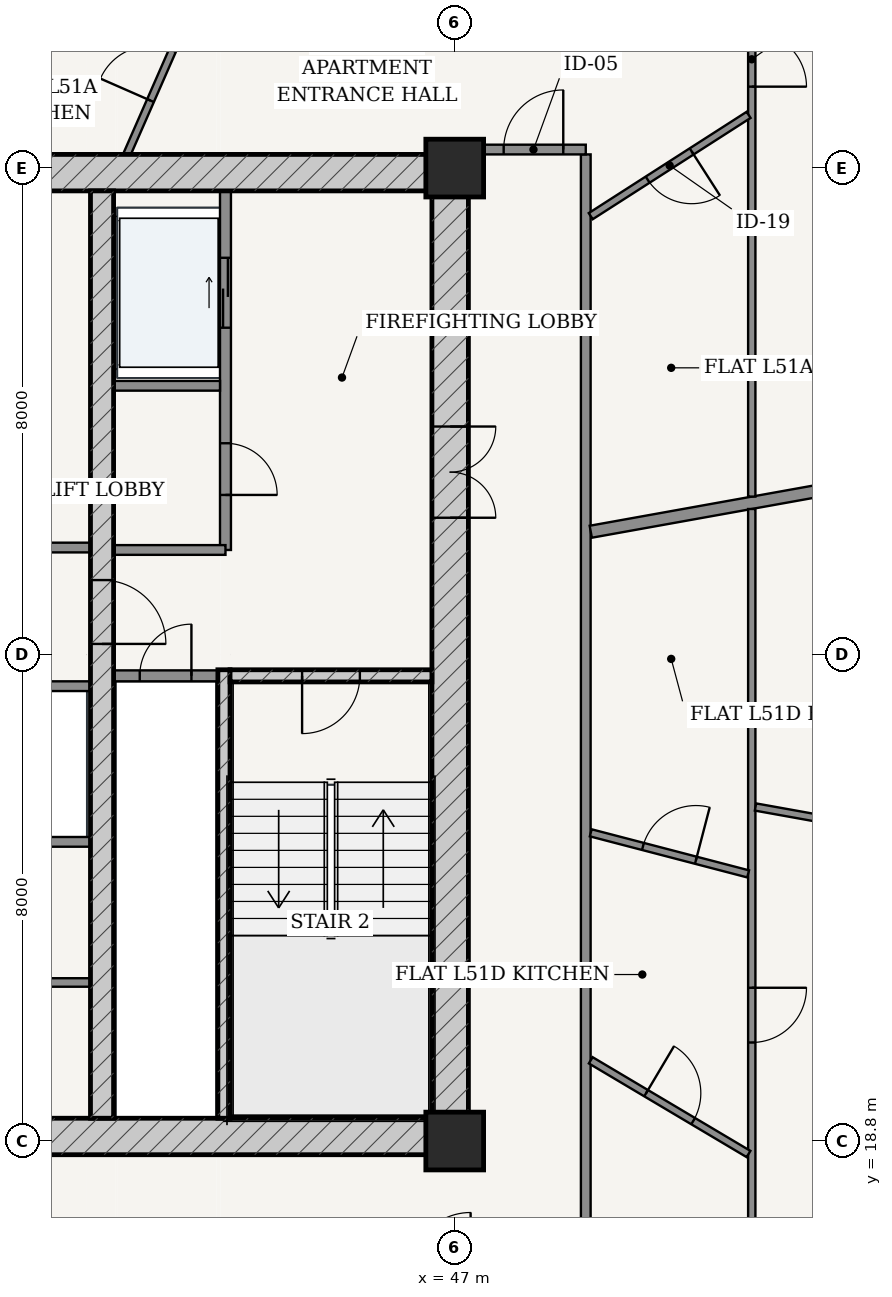
"""IFC4 building model, lengths in metres.
Left out: names, types, materials, properties, quantities, classifications, styles, units other than length and angle.
Written with IfcOpenShell. Run it as: python <this file> out.ifc"""

import sys

from ifc_helpers import new_model, si_unit, direction, frame, frame_2d, origin, origin_2d, place, context, subcontext, project, spatial, rectangle, extrude, source, transform, mapped, element, fill, save


model = new_model("IFC4")
c1 = context("Model", 3, precision=1e-05, world=origin(), true_north=direction((-0.2419218956, 0.970295726276)))
c2 = subcontext(c1, "Body", "Model", "MODEL_VIEW")
j1 = project(units=[si_unit("LENGTHUNIT", "METRE"), si_unit("PLANEANGLEUNIT", "RADIAN")], contexts=[c1])
p1 = place(None, origin())
s1 = spatial("IfcSite", under=j1, at=p1, CompositionType="ELEMENT")
p2 = place(p1, origin())
s2 = spatial("IfcBuilding", under=s1, at=p2, CompositionType="ELEMENT")
p3 = place(p2, frame((0.0, 0.0, 194.9)))
s3 = spatial("IfcBuildingStorey", under=s2, at=p3, CompositionType="ELEMENT", Elevation=194.9)
for number, where, z_axis, x_axis in (
    (1, (47.0, 18.8, 0.0), (0.0, 0.0, 1.0), (1.0, 0.0, 0.0)),
    (2, (47.0, 34.8, 0.0), (0.0, 0.0, 1.0), (1.0, 0.0, 0.0)),
):
    element("IfcColumn", number, at=place(p3, frame(where, z_axis=z_axis, x_axis=x_axis)), inside=s3, PredefinedType="COLUMN", context=c2, shape_type="SweptSolid", body=[
        extrude(rectangle(XDim=0.95, YDim=0.95, at=origin_2d()), origin(), (0.0, 0.0, 1.0), 3.7),
    ])
p4 = place(p3, frame((28.775, 18.875, 0.0), z_axis=(0.0, 0.0, 1.0), x_axis=(1.0, 0.0, 0.0)))
e3 = element("IfcWall", 3, at=p4, inside=s3, PredefinedType="SHEAR", context=c2, shape_type="SweptSolid", body=[
    extrude(rectangle(XDim=18.45, YDim=0.6, at=frame_2d((9.225, 0.0))), origin(), (0.0, 0.0, 1.0), 3.435),
])
p5 = place(p4, frame((8.8, 0.0, 0.0)))
e4 = element("IfcOpeningElement", 4, at=p5, cuts=e3, PredefinedType="OPENING", context=c2, shape_type="SweptSolid", body=[
    extrude(rectangle(XDim=0.85, YDim=2.1, at=frame_2d((0.425, 1.05))), frame((0.0, 0.31, 0.0), z_axis=(0.0, -1.0, 0.0), x_axis=(1.0, 0.0, 0.0)), (0.0, 0.0, 1.0), 0.62),
])
p6 = place(p3, frame((28.775, 34.725, 0.0), z_axis=(0.0, 0.0, 1.0), x_axis=(1.0, 0.0, 0.0)))
e5 = element("IfcWall", 5, at=p6, inside=s3, PredefinedType="SHEAR", context=c2, shape_type="SweptSolid", body=[
    extrude(rectangle(XDim=18.45, YDim=0.6, at=frame_2d((9.225, 0.0))), origin(), (0.0, 0.0, 1.0), 3.435),
])
p7 = place(p3, frame((46.925, 19.175, 0.0), z_axis=(0.0, 0.0, 1.0), x_axis=(0.0, 1.0, 0.0)))
e6 = element("IfcWall", 6, at=p7, inside=s3, PredefinedType="SHEAR", context=c2, shape_type="SweptSolid", body=[
    extrude(rectangle(XDim=15.25, YDim=0.6, at=frame_2d((7.625, 0.0))), origin(), (0.0, 0.0, 1.0), 3.435),
])
p8 = place(p7, frame((9.875, 0.0, 0.0)))
e7 = element("IfcOpeningElement", 7, at=p8, cuts=e6, PredefinedType="OPENING", context=c2, shape_type="SweptSolid", body=[
    extrude(rectangle(XDim=1.5, YDim=2.2, at=frame_2d((0.75, 1.1))), frame((0.0, 0.31, 0.0), z_axis=(0.0, -1.0, 0.0), x_axis=(1.0, 0.0, 0.0)), (0.0, 0.0, 1.0), 0.62),
])
p9 = place(p3, frame((43.205, 19.175, 0.0), z_axis=(0.0, 0.0, 1.0), x_axis=(0.0, 1.0, 0.0)))
e8 = element("IfcWall", 8, at=p9, inside=s3, PredefinedType="SOLIDWALL", context=c2, shape_type="SweptSolid", body=[
    extrude(rectangle(XDim=7.375, YDim=0.2, at=frame_2d((3.688, 0.0))), origin(), (0.0, 0.0, 1.0), 3.435),
])
p10 = place(p3, frame((43.305, 26.45, 0.0), z_axis=(0.0, 0.0, 1.0), x_axis=(1.0, 0.0, 0.0)))
e9 = element("IfcWall", 9, at=p10, inside=s3, PredefinedType="SOLIDWALL", context=c2, shape_type="SweptSolid", body=[
    extrude(rectangle(XDim=3.32, YDim=0.2, at=frame_2d((1.66, 0.0))), origin(), (0.0, 0.0, 1.0), 3.435),
])
p11 = place(p10, frame((1.185, 0.0, 0.0)))
e10 = element("IfcOpeningElement", 10, at=p11, cuts=e9, PredefinedType="OPENING", context=c2, shape_type="SweptSolid", body=[
    extrude(rectangle(XDim=0.95, YDim=2.15, at=frame_2d((0.475, 1.075))), frame((0.0, 0.11, 0.0), z_axis=(0.0, -1.0, 0.0), x_axis=(1.0, 0.0, 0.0)), (0.0, 0.0, 1.0), 0.22),
])
p12 = place(p3, frame((41.2, 19.175, 0.0), z_axis=(0.0, 0.0, 1.0), x_axis=(0.0, 1.0, 0.0)))
e11 = element("IfcWall", 11, at=p12, inside=s3, PredefinedType="SHEAR", context=c2, shape_type="SweptSolid", body=[
    extrude(rectangle(XDim=15.25, YDim=0.38, at=frame_2d((7.625, 0.0))), origin(), (0.0, 0.0, 1.0), 3.435),
])
p13 = place(p12, frame((7.8, 0.0, 0.0)))
e12 = element("IfcOpeningElement", 12, at=p13, cuts=e11, PredefinedType="OPENING", context=c2, shape_type="SweptSolid", body=[
    extrude(rectangle(XDim=1.05, YDim=2.15, at=frame_2d((0.525, 1.075))), frame((0.0, 0.2, 0.0), z_axis=(0.0, -1.0, 0.0), x_axis=(1.0, 0.0, 0.0)), (0.0, 0.0, 1.0), 0.4),
])
p14 = place(p3, frame((41.39, 26.45, 0.0), z_axis=(0.0, 0.0, 1.0), x_axis=(1.0, 0.0, 0.0)))
e13 = element("IfcWall", 13, at=p14, inside=s3, PredefinedType="PARTITIONING", context=c2, shape_type="SweptSolid", body=[
    extrude(rectangle(XDim=1.71, YDim=0.18, at=frame_2d((0.855, 0.0))), origin(), (0.0, 0.0, 1.0), 3.435),
])
p15 = place(p14, frame((0.43, 0.0, 0.0)))
e14 = element("IfcOpeningElement", 14, at=p15, cuts=e13, PredefinedType="OPENING", context=c2, shape_type="SweptSolid", body=[
    extrude(rectangle(XDim=0.85, YDim=2.1, at=frame_2d((0.425, 1.05))), frame((0.0, 0.1, 0.0), z_axis=(0.0, -1.0, 0.0), x_axis=(1.0, 0.0, 0.0)), (0.0, 0.0, 1.0), 0.2),
])
p16 = place(p3, frame((43.23, 28.52, 0.0), z_axis=(0.0, 0.0, 1.0), x_axis=(0.0, 1.0, 0.0)))
e15 = element("IfcWall", 15, at=p16, inside=s3, PredefinedType="PARTITIONING", context=c2, shape_type="SweptSolid", body=[
    extrude(rectangle(XDim=5.905, YDim=0.18, at=frame_2d((2.953, 0.0))), origin(), (0.0, 0.0, 1.0), 3.435),
])
p17 = place(p16, frame((0.905, 0.0, 0.0)))
e16 = element("IfcOpeningElement", 16, at=p17, cuts=e15, PredefinedType="OPENING", context=c2, shape_type="SweptSolid", body=[
    extrude(rectangle(XDim=0.85, YDim=2.1, at=frame_2d((0.425, 1.05))), frame((0.0, 0.1, 0.0), z_axis=(0.0, -1.0, 0.0), x_axis=(1.0, 0.0, 0.0)), (0.0, 0.0, 1.0), 0.2),
])
p18 = place(p16, frame((3.655, 0.0, 0.0)))
e17 = element("IfcOpeningElement", 17, at=p18, cuts=e15, PredefinedType="OPENING", context=c2, shape_type="SweptSolid", body=[
    extrude(rectangle(XDim=1.15, YDim=2.2, at=frame_2d((0.575, 1.1))), frame((0.0, 0.1, 0.0), z_axis=(0.0, -1.0, 0.0), x_axis=(1.0, 0.0, 0.0)), (0.0, 0.0, 1.0), 0.2),
])
p19 = place(p3, frame((41.39, 31.22, 0.0), z_axis=(0.0, 0.0, 1.0), x_axis=(1.0, 0.0, 0.0)))
e18 = element("IfcWall", 18, at=p19, inside=s3, PredefinedType="PARTITIONING", context=c2, shape_type="SweptSolid", body=[
    extrude(rectangle(XDim=1.75, YDim=0.16, at=frame_2d((0.875, 0.0))), origin(), (0.0, 0.0, 1.0), 3.435),
])
p20 = place(p3, frame((41.39, 28.52, 0.0), z_axis=(0.0, 0.0, 1.0), x_axis=(1.0, 0.0, 0.0)))
e19 = element("IfcWall", 19, at=p20, inside=s3, PredefinedType="PARTITIONING", context=c2, shape_type="SweptSolid", body=[
    extrude(rectangle(XDim=1.84, YDim=0.16, at=frame_2d((0.92, 0.0))), origin(), (0.0, 0.0, 1.0), 3.435),
])
p21 = place(p3, frame((34.99, 28.56, 0.0), z_axis=(0.0, 0.0, 1.0), x_axis=(1.0, 0.0, 0.0)))
e20 = element("IfcWall", 20, at=p21, inside=s3, PredefinedType="PARTITIONING", context=c2, shape_type="SweptSolid", body=[
    extrude(rectangle(XDim=6.02, YDim=0.16, at=frame_2d((3.01, 0.0))), origin(), (0.0, 0.0, 1.0), 3.435),
])
p22 = place(p21, frame((2.585, 0.0, 0.0)))
e21 = element("IfcOpeningElement", 21, at=p22, cuts=e20, PredefinedType="OPENING", context=c2, shape_type="SweptSolid", body=[
    extrude(rectangle(XDim=0.85, YDim=2.1, at=frame_2d((0.425, 1.05))), frame((0.0, 0.09, 0.0), z_axis=(0.0, -1.0, 0.0), x_axis=(1.0, 0.0, 0.0)), (0.0, 0.0, 1.0), 0.18),
])
p23 = place(p3, frame((34.99, 26.28, 0.0), z_axis=(0.0, 0.0, 1.0), x_axis=(1.0, 0.0, 0.0)))
e22 = element("IfcWall", 22, at=p23, inside=s3, PredefinedType="PARTITIONING", context=c2, shape_type="SweptSolid", body=[
    extrude(rectangle(XDim=6.02, YDim=0.16, at=frame_2d((3.01, 0.0))), origin(), (0.0, 0.0, 1.0), 3.435),
])
p24 = place(p23, frame((0.225, 0.0, 0.0)))
e23 = element("IfcOpeningElement", 23, at=p24, cuts=e22, PredefinedType="OPENING", context=c2, shape_type="SweptSolid", body=[
    extrude(rectangle(XDim=1.1, YDim=2.2, at=frame_2d((0.55, 1.1))), frame((0.0, 0.09, 0.0), z_axis=(0.0, -1.0, 0.0), x_axis=(1.0, 0.0, 0.0)), (0.0, 0.0, 1.0), 0.18),
])
p25 = place(p23, frame((1.705, 0.0, 0.0)))
e24 = element("IfcOpeningElement", 24, at=p25, cuts=e22, PredefinedType="OPENING", context=c2, shape_type="SweptSolid", body=[
    extrude(rectangle(XDim=1.1, YDim=2.2, at=frame_2d((0.55, 1.1))), frame((0.0, 0.09, 0.0), z_axis=(0.0, -1.0, 0.0), x_axis=(1.0, 0.0, 0.0)), (0.0, 0.0, 1.0), 0.18),
])
p26 = place(p3, frame((34.99, 23.72, 0.0), z_axis=(0.0, 0.0, 1.0), x_axis=(1.0, 0.0, 0.0)))
e25 = element("IfcWall", 25, at=p26, inside=s3, PredefinedType="PARTITIONING", context=c2, shape_type="SweptSolid", body=[
    extrude(rectangle(XDim=6.02, YDim=0.16, at=frame_2d((3.01, 0.0))), origin(), (0.0, 0.0, 1.0), 3.435),
])
p27 = place(p3, frame((34.99, 21.407, 0.0), z_axis=(0.0, 0.0, 1.0), x_axis=(1.0, 0.0, 0.0)))
e26 = element("IfcWall", 26, at=p27, inside=s3, PredefinedType="PARTITIONING", context=c2, shape_type="SweptSolid", body=[
    extrude(rectangle(XDim=6.02, YDim=0.14, at=frame_2d((3.01, 0.0))), origin(), (0.0, 0.0, 1.0), 3.435),
])
p28 = place(p27, frame((2.585, 0.0, 0.0)))
e27 = element("IfcOpeningElement", 27, at=p28, cuts=e26, PredefinedType="OPENING", context=c2, shape_type="SweptSolid", body=[
    extrude(rectangle(XDim=0.85, YDim=2.1, at=frame_2d((0.425, 1.05))), frame((0.0, 0.08, 0.0), z_axis=(0.0, -1.0, 0.0), x_axis=(1.0, 0.0, 0.0)), (0.0, 0.0, 1.0), 0.16),
])
p29 = place(p3, frame((49.155, 16.725, 0.0), z_axis=(0.0, 0.0, 1.0), x_axis=(0.0, 1.0, 0.0)))
e28 = element("IfcWall", 28, at=p29, inside=s3, PredefinedType="PARTITIONING", context=c2, shape_type="SweptSolid", body=[
    extrude(rectangle(XDim=18.3, YDim=0.16, at=frame_2d((9.15, 0.0))), origin(), (0.0, 0.0, 1.0), 2.951),
])
p30 = place(p3, frame((47.225, 35.105, 0.0), z_axis=(0.0, 0.0, 1.0), x_axis=(1.0, 0.0, 0.0)))
e29 = element("IfcWall", 29, at=p30, inside=s3, PredefinedType="PARTITIONING", context=c2, shape_type="SweptSolid", body=[
    extrude(rectangle(XDim=1.93, YDim=0.16, at=frame_2d((0.965, 0.0))), origin(), (0.0, 0.0, 1.0), 3.435),
])
p31 = place(p30, frame((0.58, 0.0, 0.0)))
e30 = element("IfcOpeningElement", 30, at=p31, cuts=e29, PredefinedType="OPENING", context=c2, shape_type="SweptSolid", body=[
    extrude(rectangle(XDim=0.98, YDim=2.2, at=frame_2d((0.49, 1.1))), frame((0.0, 0.09, 0.0), z_axis=(0.0, -1.0, 0.0), x_axis=(1.0, 0.0, 0.0)), (0.0, 0.0, 1.0), 0.18),
])
p32 = place(p3, frame((49.237, 28.82, 0.0), z_axis=(0.0, 0.0, 1.0), x_axis=(0.984224859606, 0.176922089446, 0.0)))
e31 = element("IfcWall", 31, at=p32, inside=s3, PredefinedType="PARTITIONING", context=c2, shape_type="SweptSolid", body=[
    extrude(rectangle(XDim=10.2, YDim=0.2, at=frame_2d((5.1, 0.0))), origin(), (0.0, 0.0, 1.0), 2.951),
])
p33 = place(p3, frame((51.885, 37.835, 0.0), z_axis=(0.0, 0.0, 1.0), x_axis=(0.0, -1.0, 0.0)))
e32 = element("IfcWall", 32, at=p33, inside=s3, PredefinedType="PARTITIONING", context=c2, shape_type="SweptSolid", body=[
    extrude(rectangle(XDim=8.437, YDim=0.12, at=frame_2d((4.219, 0.0))), origin(), (0.0, 0.0, 1.0), 2.951),
])
p34 = place(p33, frame((0.796, 0.0, 0.0)))
e33 = element("IfcOpeningElement", 33, at=p34, cuts=e32, PredefinedType="OPENING", context=c2, shape_type="SweptSolid", body=[
    extrude(rectangle(XDim=0.9, YDim=2.15, at=frame_2d((0.45, 1.075))), frame((0.0, 0.07, 0.0), z_axis=(0.0, -1.0, 0.0), x_axis=(1.0, 0.0, 0.0)), (0.0, 0.0, 1.0), 0.14),
])
p35 = place(p3, frame((49.237, 34.009, 0.0), z_axis=(0.0, 0.0, 1.0), x_axis=(0.841651322174, 0.540021343915, 0.0)))
e34 = element("IfcWall", 34, at=p35, inside=s3, PredefinedType="PARTITIONING", context=c2, shape_type="SweptSolid", body=[
    extrude(rectangle(XDim=3.085, YDim=0.12, at=frame_2d((1.542, 0.0))), origin(), (0.0, 0.0, 1.0), 3.11),
])
p36 = place(p35, frame((1.112, 0.0, 0.0)))
e35 = element("IfcOpeningElement", 35, at=p36, cuts=e34, PredefinedType="OPENING", context=c2, shape_type="SweptSolid", body=[
    extrude(rectangle(XDim=0.86, YDim=2.15, at=frame_2d((0.43, 1.075))), frame((0.0, 0.07, 0.0), z_axis=(0.0, -1.0, 0.0), x_axis=(1.0, 0.0, 0.0)), (0.0, 0.0, 1.0), 0.14),
])
p37 = place(p3, frame((41.61, 35.027, 0.0), z_axis=(0.0, 0.0, 1.0), x_axis=(0.401859508224, 0.915701335398, 0.0)))
e36 = element("IfcWall", 36, at=p37, inside=s3, PredefinedType="PARTITIONING", context=c2, shape_type="SweptSolid", body=[
    extrude(rectangle(XDim=2.83, YDim=0.12, at=frame_2d((1.415, 0.0))), origin(), (0.0, 0.0, 1.0), 3.435),
])
p38 = place(p37, frame((0.965, 0.0, 0.0)))
e37 = element("IfcOpeningElement", 37, at=p38, cuts=e36, PredefinedType="OPENING", context=c2, shape_type="SweptSolid", body=[
    extrude(rectangle(XDim=0.9, YDim=2.15, at=frame_2d((0.45, 1.075))), frame((0.0, 0.07, 0.0), z_axis=(0.0, -1.0, 0.0), x_axis=(1.0, 0.0, 0.0)), (0.0, 0.0, 1.0), 0.14),
])
p39 = place(p3, frame((51.885, 29.194, 0.0), z_axis=(0.0, 0.0, 1.0), x_axis=(0.0, -1.0, 0.0)))
e38 = element("IfcWall", 38, at=p39, inside=s3, PredefinedType="PARTITIONING", context=c2, shape_type="SweptSolid", body=[
    extrude(rectangle(XDim=15.279, YDim=0.12, at=frame_2d((7.639, 0.0))), origin(), (0.0, 0.0, 1.0), 2.951),
])
p40 = place(p39, frame((7.873, 0.0, 0.0)))
e39 = element("IfcOpeningElement", 39, at=p40, cuts=e38, PredefinedType="OPENING", context=c2, shape_type="SweptSolid", body=[
    extrude(rectangle(XDim=0.9, YDim=2.15, at=frame_2d((0.45, 1.075))), frame((0.0, 0.07, 0.0), z_axis=(0.0, -1.0, 0.0), x_axis=(1.0, 0.0, 0.0)), (0.0, 0.0, 1.0), 0.14),
])
p41 = place(p3, frame((51.946, 24.293, 0.0), z_axis=(0.0, 0.0, 1.0), x_axis=(0.984227185588, -0.176909149424, 0.0)))
e40 = element("IfcWall", 40, at=p41, inside=s3, PredefinedType="PARTITIONING", context=c2, shape_type="SweptSolid", body=[
    extrude(rectangle(XDim=7.448, YDim=0.12, at=frame_2d((3.724, 0.0))), origin(), (0.0, 0.0, 1.0), 2.951),
])
p42 = place(p41, frame((2.264, 0.0, 0.0)))
e41 = element("IfcOpeningElement", 41, at=p42, cuts=e40, PredefinedType="OPENING", context=c2, shape_type="SweptSolid", body=[
    extrude(rectangle(XDim=0.9, YDim=2.15, at=frame_2d((0.45, 1.075))), frame((0.0, 0.07, 0.0), z_axis=(0.0, -1.0, 0.0), x_axis=(1.0, 0.0, 0.0)), (0.0, 0.0, 1.0), 0.14),
])
p43 = place(p3, frame((49.237, 20.128, 0.0), z_axis=(0.0, 0.0, 1.0), x_axis=(0.859818120481, -0.510600430565, 0.0)))
e42 = element("IfcWall", 42, at=p43, inside=s3, PredefinedType="PARTITIONING", context=c2, shape_type="SweptSolid", body=[
    extrude(rectangle(XDim=3.018, YDim=0.12, at=frame_2d((1.509, 0.0))), origin(), (0.0, 0.0, 1.0), 2.951),
])
p44 = place(p43, frame((1.059, 0.0, 0.0)))
e43 = element("IfcOpeningElement", 43, at=p44, cuts=e42, PredefinedType="OPENING", context=c2, shape_type="SweptSolid", body=[
    extrude(rectangle(XDim=0.9, YDim=2.15, at=frame_2d((0.45, 1.075))), frame((0.0, 0.07, 0.0), z_axis=(0.0, -1.0, 0.0), x_axis=(1.0, 0.0, 0.0)), (0.0, 0.0, 1.0), 0.14),
])
p45 = place(p3, frame((49.237, 23.868, 0.0), z_axis=(0.0, 0.0, 1.0), x_axis=(0.967622119215, -0.252403316946, 0.0)))
e44 = element("IfcWall", 44, at=p45, inside=s3, PredefinedType="PARTITIONING", context=c2, shape_type="SweptSolid", body=[
    extrude(rectangle(XDim=2.675, YDim=0.12, at=frame_2d((1.337, 0.0))), origin(), (0.0, 0.0, 1.0), 3.435),
])
p46 = place(p45, frame((0.887, 0.0, 0.0)))
e45 = element("IfcOpeningElement", 45, at=p46, cuts=e44, PredefinedType="OPENING", context=c2, shape_type="SweptSolid", body=[
    extrude(rectangle(XDim=0.9, YDim=2.15, at=frame_2d((0.45, 1.075))), frame((0.0, 0.07, 0.0), z_axis=(0.0, -1.0, 0.0), x_axis=(1.0, 0.0, 0.0)), (0.0, 0.0, 1.0), 0.14),
])
m1 = source(origin(), c2, "Body", "SweptSolid", [
    extrude(rectangle(XDim=1.5, YDim=2.2, at=frame_2d((0.75, 1.1))), frame((0.0, 0.025, 0.0), z_axis=(0.0, -1.0, 0.0), x_axis=(1.0, 0.0, 0.0)), (0.0, 0.0, 1.0), 0.05),
])
p47 = place(p8, frame((1.5, 0.0, 0.0), z_axis=(0.0, 0.0, 1.0), x_axis=(-1.0, 0.0, 0.0)))
e46 = element("IfcDoor", 46, at=p47, inside=s3, OperationType="DOUBLE_DOOR_SINGLE_SWING", PredefinedType="DOOR", context=c2, shape_type="MappedRepresentation", body=[
    mapped(m1, transform((0.0, 0.0, 0.0), scale=1.0)),
])
fill(e7, e46)
m2 = source(origin(), c2, "Body", "SweptSolid", [
    extrude(rectangle(XDim=1.05, YDim=2.15, at=frame_2d((0.525, 1.075))), frame((0.0, 0.025, 0.0), z_axis=(0.0, -1.0, 0.0), x_axis=(1.0, 0.0, 0.0)), (0.0, 0.0, 1.0), 0.05),
])
p48 = place(p13, frame((1.05, 0.0, 0.0), z_axis=(0.0, 0.0, 1.0), x_axis=(-1.0, 0.0, 0.0)))
e47 = element("IfcDoor", 47, at=p48, inside=s3, OperationType="SINGLE_SWING_RIGHT", PredefinedType="DOOR", context=c2, shape_type="MappedRepresentation", body=[
    mapped(m2, transform((0.0, 0.0, 0.0), scale=1.0)),
])
fill(e12, e47)
m3 = source(origin(), c2, "Body", "SweptSolid", [
    extrude(rectangle(XDim=0.95, YDim=2.15, at=frame_2d((0.475, 1.075))), frame((0.0, 0.025, 0.0), z_axis=(0.0, -1.0, 0.0), x_axis=(1.0, 0.0, 0.0)), (0.0, 0.0, 1.0), 0.05),
])
p49 = place(p11, frame((0.95, 0.0, 0.0), z_axis=(0.0, 0.0, 1.0), x_axis=(-1.0, 0.0, 0.0)))
e48 = element("IfcDoor", 48, at=p49, inside=s3, OperationType="SINGLE_SWING_RIGHT", PredefinedType="DOOR", context=c2, shape_type="MappedRepresentation", body=[
    mapped(m3, transform((0.0, 0.0, 0.0), scale=1.0)),
])
fill(e10, e48)
m4 = source(origin(), c2, "Body", "SweptSolid", [
    extrude(rectangle(XDim=0.85, YDim=2.1, at=frame_2d((0.425, 1.05))), frame((0.0, 0.025, 0.0), z_axis=(0.0, -1.0, 0.0), x_axis=(1.0, 0.0, 0.0)), (0.0, 0.0, 1.0), 0.05),
])
p50 = place(p15, origin())
e49 = element("IfcDoor", 49, at=p50, inside=s3, OperationType="SINGLE_SWING_RIGHT", PredefinedType="DOOR", context=c2, shape_type="MappedRepresentation", body=[
    mapped(m4, transform((0.0, 0.0, 0.0), scale=1.0)),
])
fill(e14, e49)
p51 = place(p17, frame((0.85, 0.0, 0.0), z_axis=(0.0, 0.0, 1.0), x_axis=(-1.0, 0.0, 0.0)))
e50 = element("IfcDoor", 50, at=p51, inside=s3, OperationType="SINGLE_SWING_RIGHT", PredefinedType="DOOR", context=c2, shape_type="MappedRepresentation", body=[
    mapped(m4, transform((0.0, 0.0, 0.0), scale=1.0)),
])
fill(e16, e50)
m5 = source(origin(), c2, "Body", "SweptSolid", [
    extrude(rectangle(XDim=1.15, YDim=2.2, at=frame_2d((0.575, 1.1))), frame((0.0, 0.025, 0.0), z_axis=(0.0, -1.0, 0.0), x_axis=(1.0, 0.0, 0.0)), (0.0, 0.0, 1.0), 0.05),
])
p52 = place(p18, origin())
e51 = element("IfcDoor", 51, at=p52, inside=s3, OperationType="DOUBLE_DOOR_SLIDING", PredefinedType="DOOR", context=c2, shape_type="MappedRepresentation", body=[
    mapped(m5, transform((0.0, 0.0, 0.0), scale=1.0)),
])
fill(e17, e51)
m6 = source(origin(), c2, "Body", "SweptSolid", [
    extrude(rectangle(XDim=0.98, YDim=2.2, at=frame_2d((0.49, 1.1))), frame((0.0, 0.025, 0.0), z_axis=(0.0, -1.0, 0.0), x_axis=(1.0, 0.0, 0.0)), (0.0, 0.0, 1.0), 0.05),
])
p53 = place(p31, origin())
e52 = element("IfcDoor", 52, at=p53, inside=s3, OperationType="SINGLE_SWING_RIGHT", PredefinedType="DOOR", context=c2, shape_type="MappedRepresentation", body=[
    mapped(m6, transform((0.0, 0.0, 0.0), scale=1.0)),
])
fill(e30, e52)
m7 = source(origin(), c2, "Body", "SweptSolid", [
    extrude(rectangle(XDim=0.86, YDim=2.15, at=frame_2d((0.43, 1.075))), frame((0.0, 0.025, 0.0), z_axis=(0.0, -1.0, 0.0), x_axis=(1.0, 0.0, 0.0)), (0.0, 0.0, 1.0), 0.05),
])
p54 = place(p36, frame((0.86, 0.0, 0.0), z_axis=(0.0, 0.0, 1.0), x_axis=(-1.0, 0.0, 0.0)))
e53 = element("IfcDoor", 53, at=p54, inside=s3, OperationType="SINGLE_SWING_LEFT", PredefinedType="DOOR", context=c2, shape_type="MappedRepresentation", body=[
    mapped(m7, transform((0.0, 0.0, 0.0), scale=1.0)),
])
fill(e35, e53)
m8 = source(origin(), c2, "Body", "SweptSolid", [
    extrude(rectangle(XDim=0.9, YDim=2.15, at=frame_2d((0.45, 1.075))), frame((0.0, 0.025, 0.0), z_axis=(0.0, -1.0, 0.0), x_axis=(1.0, 0.0, 0.0)), (0.0, 0.0, 1.0), 0.05),
])
p55 = place(p34, origin())
e54 = element("IfcDoor", 54, at=p55, inside=s3, OperationType="SINGLE_SWING_RIGHT", PredefinedType="DOOR", context=c2, shape_type="MappedRepresentation", body=[
    mapped(m8, transform((0.0, 0.0, 0.0), scale=1.0)),
])
fill(e33, e54)
p56 = place(p38, origin())
e55 = element("IfcDoor", 55, at=p56, inside=s3, OperationType="SINGLE_SWING_LEFT", PredefinedType="DOOR", context=c2, shape_type="MappedRepresentation", body=[
    mapped(m8, transform((0.0, 0.0, 0.0), scale=1.0)),
])
fill(e37, e55)
p57 = place(p44, origin())
e56 = element("IfcDoor", 56, at=p57, inside=s3, OperationType="SINGLE_SWING_LEFT", PredefinedType="DOOR", context=c2, shape_type="MappedRepresentation", body=[
    mapped(m8, transform((0.0, 0.0, 0.0), scale=1.0)),
])
fill(e43, e56)
p58 = place(p46, origin())
e57 = element("IfcDoor", 57, at=p58, inside=s3, OperationType="SINGLE_SWING_RIGHT", PredefinedType="DOOR", context=c2, shape_type="MappedRepresentation", body=[
    mapped(m8, transform((0.0, 0.0, 0.0), scale=1.0)),
])
fill(e45, e57)
p59 = place(p40, origin())
e58 = element("IfcDoor", 58, at=p59, inside=s3, OperationType="SINGLE_SWING_LEFT", PredefinedType="DOOR", context=c2, shape_type="MappedRepresentation", body=[
    mapped(m8, transform((0.0, 0.0, 0.0), scale=1.0)),
])
fill(e39, e58)
save(model, sys.argv[1])
